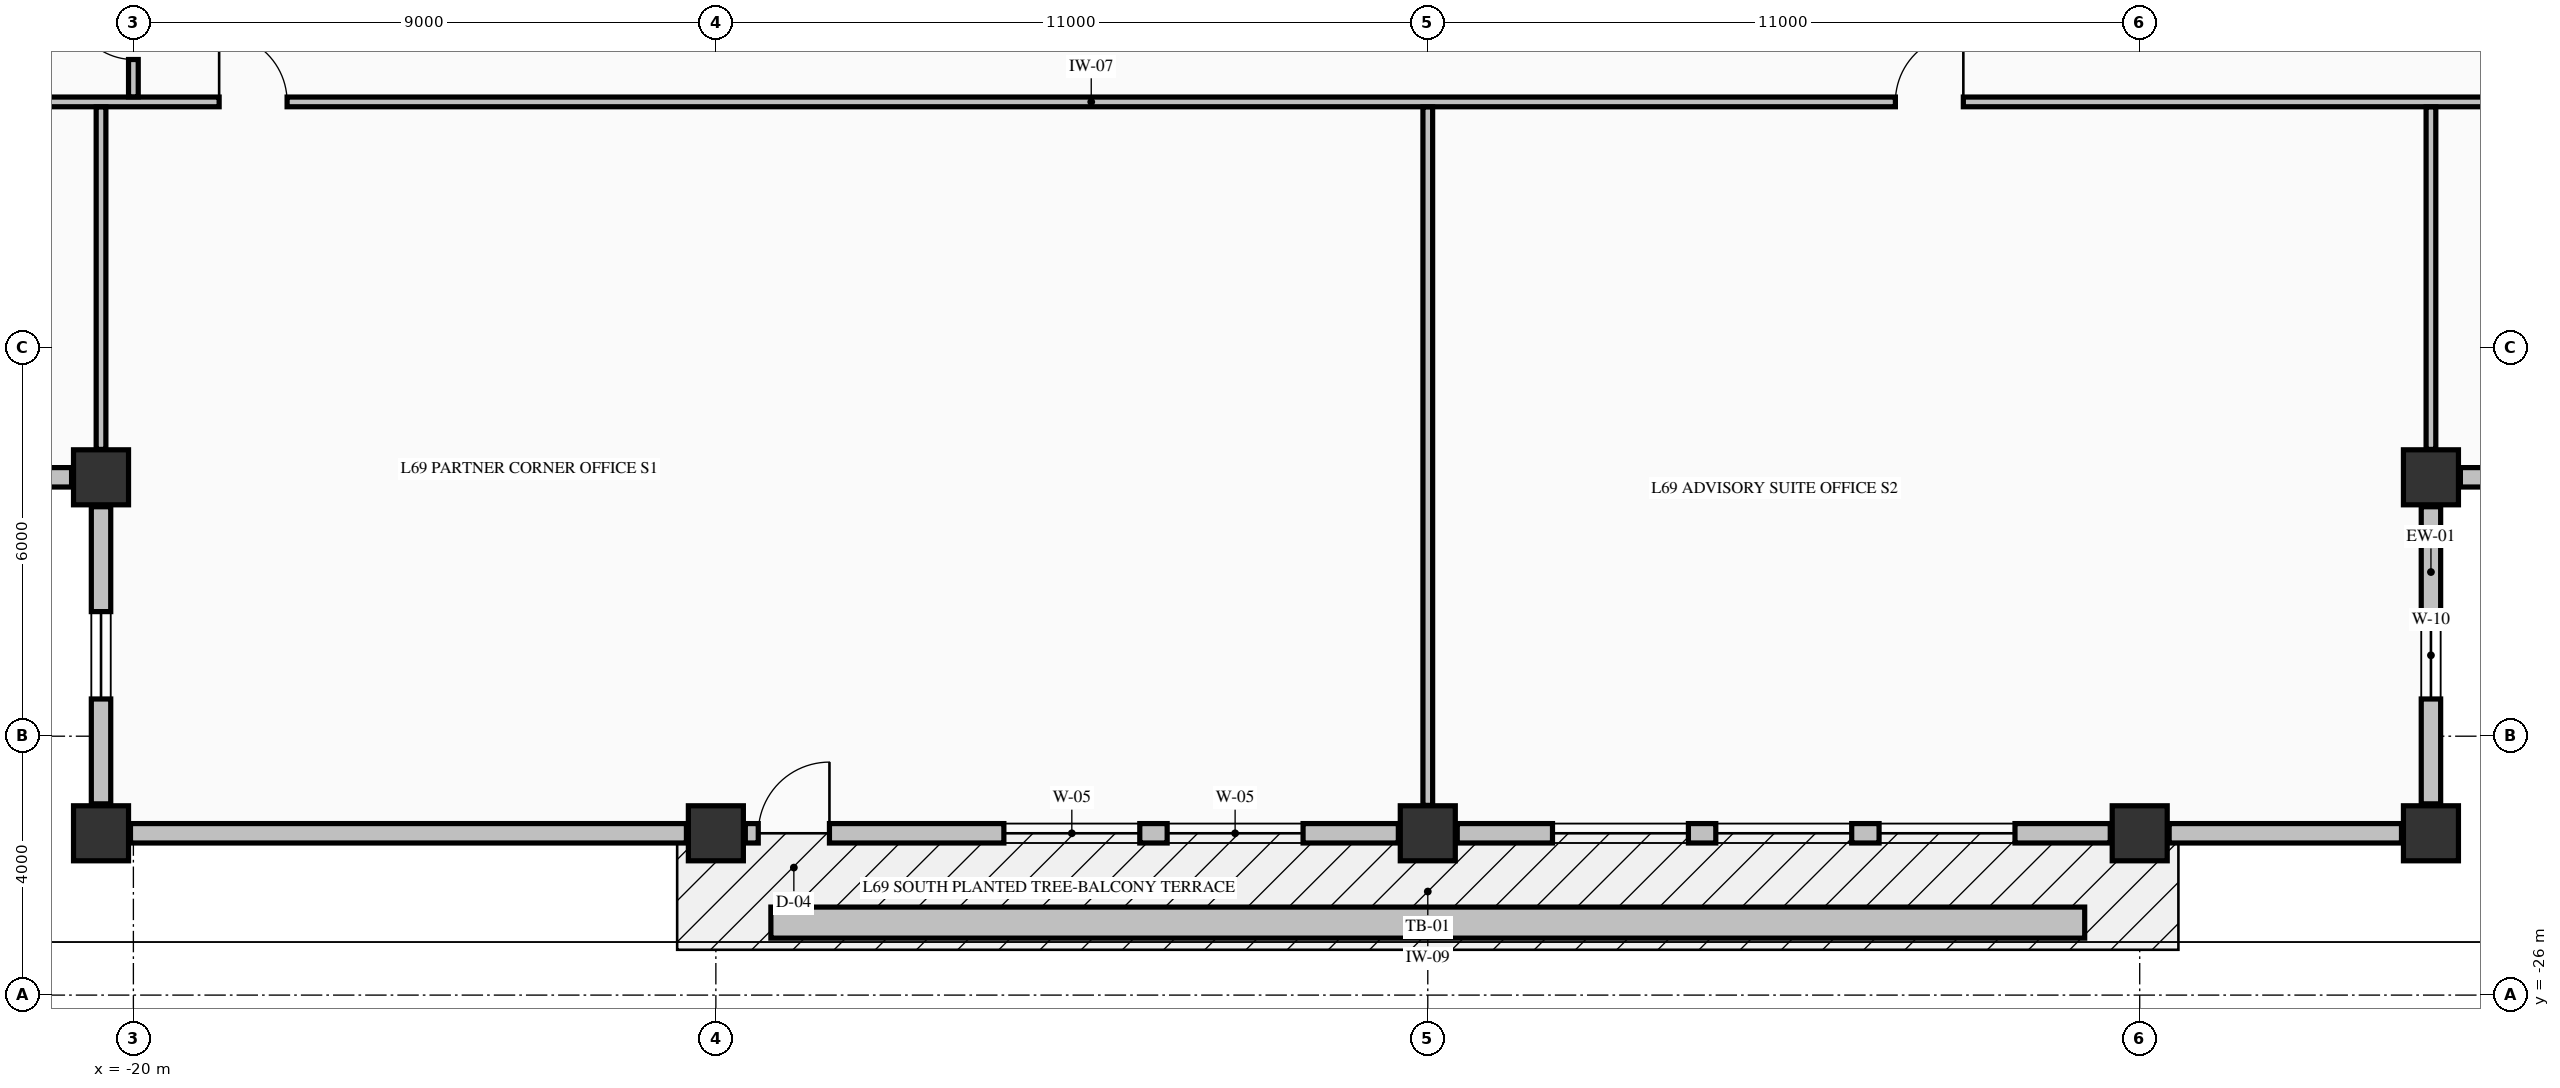
"""IFC4 building model, lengths in metres.
Left out: names, types, materials, properties, quantities, classifications, styles, units other than length and angle.
Written with IfcOpenShell. Run it as: python <this file> out.ifc"""

import sys

from ifc_helpers import new_model, si_unit, direction, frame, frame_2d, origin, origin_2d, place, context, subcontext, project, spatial, rectangle, extrude, element, fill, save


model = new_model("IFC4")
c1 = context("Model", 3, precision=1e-05, world=origin(), true_north=direction((0.0, 1.0)))
c2 = subcontext(c1, "Body", "Model", "MODEL_VIEW")
j1 = project(units=[si_unit("LENGTHUNIT", "METRE"), si_unit("PLANEANGLEUNIT", "RADIAN")], contexts=[c1])
p1 = place(None, origin())
s1 = spatial("IfcSite", under=j1, at=p1, CompositionType="ELEMENT")
p2 = place(p1, origin())
s2 = spatial("IfcBuilding", under=s1, at=p2, CompositionType="ELEMENT")
p3 = place(p2, frame((0.0, 0.0, 260.89)))
s3 = spatial("IfcBuildingStorey", under=s2, at=p3, CompositionType="ELEMENT", Elevation=260.89)
for number, where, z_axis, x_axis in (
    (1, (-20.5, -23.5, -0.25), (0.0, 0.0, 1.0), (1.0, 0.0, 0.0)),
    (2, (-11.0, -23.5, -0.25), (0.0, 0.0, 1.0), (1.0, 0.0, 0.0)),
    (3, (0.0, -23.5, -0.25), (0.0, 0.0, 1.0), (1.0, 0.0, 0.0)),
    (4, (11.0, -23.5, -0.25), (0.0, 0.0, 1.0), (1.0, 0.0, 0.0)),
    (5, (15.5, -23.5, -0.25), (0.0, 0.0, 1.0), (1.0, 0.0, 0.0)),
    (6, (-20.5, -18.0, -0.25), (0.0, 0.0, 1.0), (1.0, 0.0, 0.0)),
    (7, (15.5, -18.0, -0.25), (0.0, 0.0, 1.0), (1.0, 0.0, 0.0)),
):
    element("IfcColumn", number, at=place(p3, frame(where, z_axis=z_axis, x_axis=x_axis)), inside=s3, PredefinedType="COLUMN", context=c2, shape_type="SweptSolid", body=[
        extrude(rectangle(XDim=0.85, YDim=0.85, at=origin_2d()), origin(), (0.0, 0.0, 1.0), 3.23),
    ])
p4 = place(p3, frame((15.5, -23.045, 0.0), z_axis=(0.0, 0.0, 1.0), x_axis=(0.0, 1.0, 0.0)))
e8 = element("IfcWall", 8, at=p4, inside=s3, PredefinedType="STANDARD", context=c2, shape_type="SweptSolid", body=[
    extrude(rectangle(XDim=4.59, YDim=0.3, at=frame_2d((2.295, 0.0))), origin(), (0.0, 0.0, 1.0), 2.372),
])
p5 = place(p4, frame((1.62, 0.0, 0.68)))
e9 = element("IfcOpeningElement", 9, at=p5, cuts=e8, PredefinedType="OPENING", context=c2, shape_type="SweptSolid", body=[
    extrude(rectangle(XDim=1.35, YDim=1.42, at=frame_2d((0.675, 0.71))), frame((0.0, 0.16, 0.0), z_axis=(0.0, -1.0, 0.0), x_axis=(1.0, 0.0, 0.0)), (0.0, 0.0, 1.0), 0.32),
])
p6 = place(p3, frame((15.955, -18.0, 0.0), z_axis=(0.0, 0.0, 1.0), x_axis=(1.0, 0.0, 0.0)))
e10 = element("IfcWall", 10, at=p6, inside=s3, PredefinedType="STANDARD", context=c2, shape_type="SweptSolid", body=[
    extrude(rectangle(XDim=4.59, YDim=0.3, at=frame_2d((2.295, 0.0))), origin(), (0.0, 0.0, 1.0), 2.372),
])
p7 = place(p6, frame((1.62, 0.0, 0.68)))
e11 = element("IfcOpeningElement", 11, at=p7, cuts=e10, PredefinedType="OPENING", context=c2, shape_type="SweptSolid", body=[
    extrude(rectangle(XDim=1.35, YDim=1.42, at=frame_2d((0.675, 0.71))), frame((0.0, 0.16, 0.0), z_axis=(0.0, -1.0, 0.0), x_axis=(1.0, 0.0, 0.0)), (0.0, 0.0, 1.0), 0.32),
])
p8 = place(p3, frame((-25.545, -18.0, 0.0), z_axis=(0.0, 0.0, 1.0), x_axis=(1.0, 0.0, 0.0)))
e12 = element("IfcWall", 12, at=p8, inside=s3, PredefinedType="STANDARD", context=c2, shape_type="SweptSolid", body=[
    extrude(rectangle(XDim=4.59, YDim=0.3, at=frame_2d((2.295, 0.0))), origin(), (0.0, 0.0, 1.0), 2.372),
])
p9 = place(p8, frame((1.62, 0.0, 0.68)))
e13 = element("IfcOpeningElement", 13, at=p9, cuts=e12, PredefinedType="OPENING", context=c2, shape_type="SweptSolid", body=[
    extrude(rectangle(XDim=1.35, YDim=1.42, at=frame_2d((0.675, 0.71))), frame((0.0, 0.16, 0.0), z_axis=(0.0, -1.0, 0.0), x_axis=(1.0, 0.0, 0.0)), (0.0, 0.0, 1.0), 0.32),
])
p10 = place(p3, frame((-20.5, -18.455, 0.0), z_axis=(0.0, 0.0, 1.0), x_axis=(0.0, -1.0, 0.0)))
e14 = element("IfcWall", 14, at=p10, inside=s3, PredefinedType="STANDARD", context=c2, shape_type="SweptSolid", body=[
    extrude(rectangle(XDim=4.59, YDim=0.3, at=frame_2d((2.295, 0.0))), origin(), (0.0, 0.0, 1.0), 2.372),
])
p11 = place(p10, frame((1.62, 0.0, 0.68)))
e15 = element("IfcOpeningElement", 15, at=p11, cuts=e14, PredefinedType="OPENING", context=c2, shape_type="SweptSolid", body=[
    extrude(rectangle(XDim=1.35, YDim=1.42, at=frame_2d((0.675, 0.71))), frame((0.0, 0.16, 0.0), z_axis=(0.0, -1.0, 0.0), x_axis=(1.0, 0.0, 0.0)), (0.0, 0.0, 1.0), 0.32),
])
p12 = place(p3, frame((-20.045, -23.5, 0.0), z_axis=(0.0, 0.0, 1.0), x_axis=(1.0, 0.0, 0.0)))
e16 = element("IfcWall", 16, at=p12, inside=s3, PredefinedType="STANDARD", context=c2, shape_type="SweptSolid", body=[
    extrude(rectangle(XDim=8.59, YDim=0.3, at=frame_2d((4.295, 0.0))), origin(), (0.0, 0.0, 1.0), 2.372),
])
p13 = place(p3, frame((-10.545, -23.5, 0.0), z_axis=(0.0, 0.0, 1.0), x_axis=(1.0, 0.0, 0.0)))
e17 = element("IfcWall", 17, at=p13, inside=s3, PredefinedType="STANDARD", context=c2, shape_type="SweptSolid", body=[
    extrude(rectangle(XDim=10.09, YDim=0.3, at=frame_2d((5.045, 0.0))), origin(), (0.0, 0.0, 1.0), 2.372),
])
p14 = place(p13, frame((0.2, 0.0, 0.0)))
e18 = element("IfcOpeningElement", 18, at=p14, cuts=e17, PredefinedType="OPENING", context=c2, shape_type="SweptSolid", body=[
    extrude(rectangle(XDim=1.1, YDim=2.15, at=frame_2d((0.55, 1.075))), frame((0.0, 0.16, 0.0), z_axis=(0.0, -1.0, 0.0), x_axis=(1.0, 0.0, 0.0)), (0.0, 0.0, 1.0), 0.32),
])
p15 = place(p13, frame((3.995, 0.0, 0.7)))
e19 = element("IfcOpeningElement", 19, at=p15, cuts=e17, PredefinedType="OPENING", context=c2, shape_type="SweptSolid", body=[
    extrude(rectangle(XDim=2.1, YDim=1.5, at=frame_2d((1.05, 0.75))), frame((0.0, 0.16, 0.0), z_axis=(0.0, -1.0, 0.0), x_axis=(1.0, 0.0, 0.0)), (0.0, 0.0, 1.0), 0.32),
])
p16 = place(p13, frame((6.518, 0.0, 0.7)))
e20 = element("IfcOpeningElement", 20, at=p16, cuts=e17, PredefinedType="OPENING", context=c2, shape_type="SweptSolid", body=[
    extrude(rectangle(XDim=2.1, YDim=1.5, at=frame_2d((1.05, 0.75))), frame((0.0, 0.16, 0.0), z_axis=(0.0, -1.0, 0.0), x_axis=(1.0, 0.0, 0.0)), (0.0, 0.0, 1.0), 0.32),
])
p17 = place(p3, frame((0.455, -23.5, 0.0), z_axis=(0.0, 0.0, 1.0), x_axis=(1.0, 0.0, 0.0)))
e21 = element("IfcWall", 21, at=p17, inside=s3, PredefinedType="STANDARD", context=c2, shape_type="SweptSolid", body=[
    extrude(rectangle(XDim=10.09, YDim=0.3, at=frame_2d((5.045, 0.0))), origin(), (0.0, 0.0, 1.0), 2.372),
])
p18 = place(p17, frame((1.472, 0.0, 0.7)))
e22 = element("IfcOpeningElement", 22, at=p18, cuts=e21, PredefinedType="OPENING", context=c2, shape_type="SweptSolid", body=[
    extrude(rectangle(XDim=2.1, YDim=1.5, at=frame_2d((1.05, 0.75))), frame((0.0, 0.16, 0.0), z_axis=(0.0, -1.0, 0.0), x_axis=(1.0, 0.0, 0.0)), (0.0, 0.0, 1.0), 0.32),
])
p19 = place(p17, frame((3.995, 0.0, 0.7)))
e23 = element("IfcOpeningElement", 23, at=p19, cuts=e21, PredefinedType="OPENING", context=c2, shape_type="SweptSolid", body=[
    extrude(rectangle(XDim=2.1, YDim=1.5, at=frame_2d((1.05, 0.75))), frame((0.0, 0.16, 0.0), z_axis=(0.0, -1.0, 0.0), x_axis=(1.0, 0.0, 0.0)), (0.0, 0.0, 1.0), 0.32),
])
p20 = place(p17, frame((6.518, 0.0, 0.7)))
e24 = element("IfcOpeningElement", 24, at=p20, cuts=e21, PredefinedType="OPENING", context=c2, shape_type="SweptSolid", body=[
    extrude(rectangle(XDim=2.1, YDim=1.5, at=frame_2d((1.05, 0.75))), frame((0.0, 0.16, 0.0), z_axis=(0.0, -1.0, 0.0), x_axis=(1.0, 0.0, 0.0)), (0.0, 0.0, 1.0), 0.32),
])
p21 = place(p3, frame((11.455, -23.5, 0.0), z_axis=(0.0, 0.0, 1.0), x_axis=(1.0, 0.0, 0.0)))
e25 = element("IfcWall", 25, at=p21, inside=s3, PredefinedType="STANDARD", context=c2, shape_type="SweptSolid", body=[
    extrude(rectangle(XDim=3.59, YDim=0.3, at=frame_2d((1.795, 0.0))), origin(), (0.0, 0.0, 1.0), 2.372),
])
p22 = place(p3, frame((-25.835, -12.2, 0.0), z_axis=(0.0, 0.0, 1.0), x_axis=(1.0, 0.0, 0.0)))
e26 = element("IfcWall", 26, at=p22, inside=s3, PredefinedType="PARTITIONING", context=c2, shape_type="SweptSolid", body=[
    extrude(rectangle(XDim=45.91, YDim=0.15, at=frame_2d((22.955, 0.0))), origin(), (0.0, 0.0, 1.0), 2.98),
])
p23 = place(p22, frame((7.16, 0.0, 0.0)))
e27 = element("IfcOpeningElement", 27, at=p23, cuts=e26, PredefinedType="OPENING", context=c2, shape_type="SweptSolid", body=[
    extrude(rectangle(XDim=1.05, YDim=2.15, at=frame_2d((0.525, 1.075))), frame((0.0, 0.085, 0.0), z_axis=(0.0, -1.0, 0.0), x_axis=(1.0, 0.0, 0.0)), (0.0, 0.0, 1.0), 0.17),
])
p24 = place(p22, frame((33.06, 0.0, 0.0)))
e28 = element("IfcOpeningElement", 28, at=p24, cuts=e26, PredefinedType="OPENING", context=c2, shape_type="SweptSolid", body=[
    extrude(rectangle(XDim=1.05, YDim=2.15, at=frame_2d((0.525, 1.075))), frame((0.0, 0.085, 0.0), z_axis=(0.0, -1.0, 0.0), x_axis=(1.0, 0.0, 0.0)), (0.0, 0.0, 1.0), 0.17),
])
p25 = place(p3, frame((-20.5, -17.569, 0.0), z_axis=(0.0, 0.0, 1.0), x_axis=(0.0, 1.0, 0.0)))
e29 = element("IfcWall", 29, at=p25, inside=s3, PredefinedType="PARTITIONING", context=c2, shape_type="SweptSolid", body=[
    extrude(rectangle(XDim=5.291, YDim=0.15, at=frame_2d((2.646, 0.0))), origin(), (0.0, 0.0, 1.0), 2.98),
])
p26 = place(p3, frame((-20.0, -12.122, 0.0), z_axis=(0.0, 0.0, 1.0), x_axis=(0.0, 1.0, 0.0)))
e30 = element("IfcWall", 30, at=p26, inside=s3, PredefinedType="PARTITIONING", context=c2, shape_type="SweptSolid", body=[
    extrude(rectangle(XDim=1.816, YDim=0.15, at=frame_2d((0.908, 0.0))), origin(), (0.0, 0.0, 1.0), 2.98),
])
p27 = place(p26, frame((0.577, 0.0, 0.0)))
e31 = element("IfcOpeningElement", 31, at=p27, cuts=e30, PredefinedType="OPENING", context=c2, shape_type="SweptSolid", body=[
    extrude(rectangle(XDim=0.95, YDim=2.15, at=frame_2d((0.475, 1.075))), frame((0.0, 0.085, 0.0), z_axis=(0.0, -1.0, 0.0), x_axis=(1.0, 0.0, 0.0)), (0.0, 0.0, 1.0), 0.17),
])
p28 = place(p3, frame((0.0, -23.069, 0.0), z_axis=(0.0, 0.0, 1.0), x_axis=(0.0, 1.0, 0.0)))
e32 = element("IfcWall", 32, at=p28, inside=s3, PredefinedType="PARTITIONING", context=c2, shape_type="SweptSolid", body=[
    extrude(rectangle(XDim=10.791, YDim=0.15, at=frame_2d((5.396, 0.0))), origin(), (0.0, 0.0, 1.0), 2.57),
])
p29 = place(p3, frame((15.5, -17.569, 0.0), z_axis=(0.0, 0.0, 1.0), x_axis=(0.0, 1.0, 0.0)))
e33 = element("IfcWall", 33, at=p29, inside=s3, PredefinedType="PARTITIONING", context=c2, shape_type="SweptSolid", body=[
    extrude(rectangle(XDim=5.291, YDim=0.15, at=frame_2d((2.646, 0.0))), origin(), (0.0, 0.0, 1.0), 2.98),
])
p30 = place(p3, frame((-10.15, -24.88, -0.04), z_axis=(0.0, 0.0, 1.0), x_axis=(1.0, 0.0, 0.0)))
e34 = element("IfcWall", 34, at=p30, inside=s3, PredefinedType="PARAPET", context=c2, shape_type="SweptSolid", body=[
    extrude(rectangle(XDim=20.3, YDim=0.48, at=frame_2d((10.15, 0.0))), origin(), (0.0, 0.0, 1.0), 0.52),
])
p31 = place(p5, origin())
e35 = element("IfcWindow", 35, at=p31, inside=s3, PartitioningType="SINGLE_PANEL", PredefinedType="WINDOW", context=c2, shape_type="SweptSolid", body=[
    extrude(rectangle(XDim=1.35, YDim=1.42, at=frame_2d((0.675, 0.71))), frame((0.0, 0.03, 0.0), z_axis=(0.0, -1.0, 0.0), x_axis=(1.0, 0.0, 0.0)), (0.0, 0.0, 1.0), 0.06),
])
fill(e9, e35)
p32 = place(p11, origin())
e36 = element("IfcWindow", 36, at=p32, inside=s3, PartitioningType="SINGLE_PANEL", PredefinedType="WINDOW", context=c2, shape_type="SweptSolid", body=[
    extrude(rectangle(XDim=1.35, YDim=1.42, at=frame_2d((0.675, 0.71))), frame((0.0, 0.03, 0.0), z_axis=(0.0, -1.0, 0.0), x_axis=(1.0, 0.0, 0.0)), (0.0, 0.0, 1.0), 0.06),
])
fill(e15, e36)
p33 = place(p14, origin())
e37 = element("IfcDoor", 37, at=p33, inside=s3, OperationType="SINGLE_SWING_RIGHT", PredefinedType="DOOR", context=c2, shape_type="SweptSolid", body=[
    extrude(rectangle(XDim=1.1, YDim=2.15, at=frame_2d((0.55, 1.075))), frame((0.0, 0.025, 0.0), z_axis=(0.0, -1.0, 0.0), x_axis=(1.0, 0.0, 0.0)), (0.0, 0.0, 1.0), 0.05),
])
fill(e18, e37)
p34 = place(p15, origin())
e38 = element("IfcWindow", 38, at=p34, inside=s3, PartitioningType="SINGLE_PANEL", PredefinedType="WINDOW", context=c2, shape_type="SweptSolid", body=[
    extrude(rectangle(XDim=2.1, YDim=1.5, at=frame_2d((1.05, 0.75))), frame((0.0, 0.03, 0.0), z_axis=(0.0, -1.0, 0.0), x_axis=(1.0, 0.0, 0.0)), (0.0, 0.0, 1.0), 0.06),
])
fill(e19, e38)
p35 = place(p16, origin())
e39 = element("IfcWindow", 39, at=p35, inside=s3, PartitioningType="SINGLE_PANEL", PredefinedType="WINDOW", context=c2, shape_type="SweptSolid", body=[
    extrude(rectangle(XDim=2.1, YDim=1.5, at=frame_2d((1.05, 0.75))), frame((0.0, 0.03, 0.0), z_axis=(0.0, -1.0, 0.0), x_axis=(1.0, 0.0, 0.0)), (0.0, 0.0, 1.0), 0.06),
])
fill(e20, e39)
p36 = place(p18, origin())
e40 = element("IfcWindow", 40, at=p36, inside=s3, PartitioningType="SINGLE_PANEL", PredefinedType="WINDOW", context=c2, shape_type="SweptSolid", body=[
    extrude(rectangle(XDim=2.1, YDim=1.5, at=frame_2d((1.05, 0.75))), frame((0.0, 0.03, 0.0), z_axis=(0.0, -1.0, 0.0), x_axis=(1.0, 0.0, 0.0)), (0.0, 0.0, 1.0), 0.06),
])
fill(e22, e40)
p37 = place(p19, origin())
e41 = element("IfcWindow", 41, at=p37, inside=s3, PartitioningType="SINGLE_PANEL", PredefinedType="WINDOW", context=c2, shape_type="SweptSolid", body=[
    extrude(rectangle(XDim=2.1, YDim=1.5, at=frame_2d((1.05, 0.75))), frame((0.0, 0.03, 0.0), z_axis=(0.0, -1.0, 0.0), x_axis=(1.0, 0.0, 0.0)), (0.0, 0.0, 1.0), 0.06),
])
fill(e23, e41)
p38 = place(p20, origin())
e42 = element("IfcWindow", 42, at=p38, inside=s3, PartitioningType="SINGLE_PANEL", PredefinedType="WINDOW", context=c2, shape_type="SweptSolid", body=[
    extrude(rectangle(XDim=2.1, YDim=1.5, at=frame_2d((1.05, 0.75))), frame((0.0, 0.03, 0.0), z_axis=(0.0, -1.0, 0.0), x_axis=(1.0, 0.0, 0.0)), (0.0, 0.0, 1.0), 0.06),
])
fill(e24, e42)
p39 = place(p23, origin())
e43 = element("IfcDoor", 43, at=p39, inside=s3, OperationType="SINGLE_SWING_LEFT", PredefinedType="DOOR", context=c2, shape_type="SweptSolid", body=[
    extrude(rectangle(XDim=1.05, YDim=2.15, at=frame_2d((0.525, 1.075))), frame((0.0, 0.025, 0.0), z_axis=(0.0, -1.0, 0.0), x_axis=(1.0, 0.0, 0.0)), (0.0, 0.0, 1.0), 0.05),
])
fill(e27, e43)
p40 = place(p24, origin())
e44 = element("IfcDoor", 44, at=p40, inside=s3, OperationType="SINGLE_SWING_RIGHT", PredefinedType="DOOR", context=c2, shape_type="SweptSolid", body=[
    extrude(rectangle(XDim=1.05, YDim=2.15, at=frame_2d((0.525, 1.075))), frame((0.0, 0.025, 0.0), z_axis=(0.0, -1.0, 0.0), x_axis=(1.0, 0.0, 0.0)), (0.0, 0.0, 1.0), 0.05),
])
fill(e28, e44)
p41 = place(p27, origin())
e45 = element("IfcDoor", 45, at=p41, inside=s3, OperationType="SINGLE_SWING_RIGHT", PredefinedType="DOOR", context=c2, shape_type="SweptSolid", body=[
    extrude(rectangle(XDim=0.95, YDim=2.15, at=frame_2d((0.475, 1.075))), frame((0.0, 0.025, 0.0), z_axis=(0.0, -1.0, 0.0), x_axis=(1.0, 0.0, 0.0)), (0.0, 0.0, 1.0), 0.05),
])
fill(e31, e45)
save(model, sys.argv[1])
